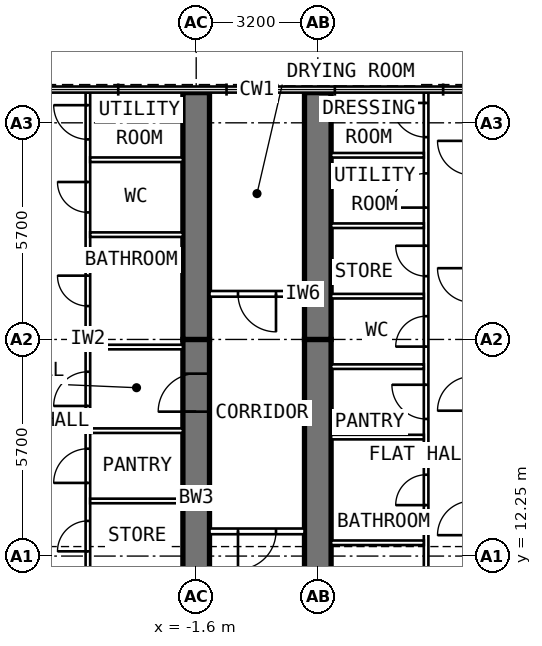
"""IFC4 building model, lengths in metres.
Left out: names, types, materials, properties, quantities, classifications, styles, units other than length and angle.
Written with IfcOpenShell. Run it as: python <this file> out.ifc"""

import sys

from ifc_helpers import new_model, si_unit, direction, frame, frame_2d, origin, place, context, subcontext, project, spatial, rectangle, extrude, element, fill, save


model = new_model("IFC4")
c1 = context("Model", 3, precision=1e-05, world=origin(), true_north=direction((0.0, 1.0)))
c2 = subcontext(c1, "Body", "Model", "MODEL_VIEW")
j1 = project(units=[si_unit("LENGTHUNIT", "METRE"), si_unit("PLANEANGLEUNIT", "RADIAN")], contexts=[c1])
p1 = place(None, origin())
s1 = spatial("IfcSite", under=j1, at=p1, CompositionType="ELEMENT")
p2 = place(p1, origin())
s2 = spatial("IfcBuilding", under=s1, at=p2, CompositionType="ELEMENT")
p3 = place(p2, frame((0.0, 0.0, 271.0)))
s3 = spatial("IfcBuildingStorey", under=s2, at=p3, CompositionType="ELEMENT", Elevation=271.0)
p4 = place(p3, frame((-1.6, 9.6, 0.0), z_axis=(0.0, 0.0, 1.0), x_axis=(0.0, 1.0, 0.0)))
e1 = element("IfcWall", 1, at=p4, inside=s3, PredefinedType="SHEAR", context=c2, shape_type="SweptSolid", body=[
    extrude(rectangle(XDim=8.35, YDim=0.7, at=frame_2d((4.175, 0.0))), origin(), (0.0, 0.0, 1.0), 3.6),
])
p5 = place(p4, frame((6.45, 0.0, 0.0)))
e2 = element("IfcOpeningElement", 2, at=p5, cuts=e1, PredefinedType="OPENING", context=c2, shape_type="SweptSolid", body=[
    extrude(rectangle(XDim=1.0, YDim=2.1, at=frame_2d((0.5, 1.05))), frame((0.0, 0.362, 0.0), z_axis=(0.0, -1.0, 0.0), x_axis=(1.0, 0.0, 0.0)), (0.0, 0.0, 1.0), 0.724),
])
p6 = place(p3, frame((-1.6, 17.95, 0.0), z_axis=(0.0, 0.0, 1.0), x_axis=(0.0, 1.0, 0.0)))
e3 = element("IfcWall", 3, at=p6, inside=s3, PredefinedType="SHEAR", context=c2, shape_type="SweptSolid", body=[
    extrude(rectangle(XDim=6.495, YDim=0.7, at=frame_2d((3.248, 0.0))), origin(), (0.0, 0.0, 1.0), 3.6),
])
p7 = place(p3, frame((1.6, 9.6, 0.0), z_axis=(0.0, 0.0, 1.0), x_axis=(0.0, 1.0, 0.0)))
e4 = element("IfcWall", 4, at=p7, inside=s3, PredefinedType="SHEAR", context=c2, shape_type="SweptSolid", body=[
    extrude(rectangle(XDim=8.35, YDim=0.7, at=frame_2d((4.175, 0.0))), origin(), (0.0, 0.0, 1.0), 3.6),
])
p8 = place(p7, frame((1.3, 0.0, 0.0)))
e5 = element("IfcOpeningElement", 5, at=p8, cuts=e4, PredefinedType="OPENING", context=c2, shape_type="SweptSolid", body=[
    extrude(rectangle(XDim=1.0, YDim=2.1, at=frame_2d((0.5, 1.05))), frame((0.0, 0.362, 0.0), z_axis=(0.0, -1.0, 0.0), x_axis=(1.0, 0.0, 0.0)), (0.0, 0.0, 1.0), 0.724),
])
p9 = place(p3, frame((1.6, 17.95, 0.0), z_axis=(0.0, 0.0, 1.0), x_axis=(0.0, 1.0, 0.0)))
e6 = element("IfcWall", 6, at=p9, inside=s3, PredefinedType="SHEAR", context=c2, shape_type="SweptSolid", body=[
    extrude(rectangle(XDim=6.495, YDim=0.7, at=frame_2d((3.248, 0.0))), origin(), (0.0, 0.0, 1.0), 3.6),
])
p10 = place(p3, frame((-4.45, 9.875, 0.0), z_axis=(0.0, 0.0, 1.0), x_axis=(0.0, 1.0, 0.0)))
e7 = element("IfcWall", 7, at=p10, inside=s3, PredefinedType="PARTITIONING", context=c2, shape_type="SweptSolid", body=[
    extrude(rectangle(XDim=14.57, YDim=0.12, at=frame_2d((7.285, 0.0))), origin(), (0.0, 0.0, 1.0), 3.35),
])
p11 = place(p10, frame((0.6, 0.0, 0.0)))
e8 = element("IfcOpeningElement", 8, at=p11, cuts=e7, PredefinedType="OPENING", context=c2, shape_type="SweptSolid", body=[
    extrude(rectangle(XDim=0.9, YDim=2.1, at=frame_2d((0.45, 1.05))), frame((0.0, 0.072, 0.0), z_axis=(0.0, -1.0, 0.0), x_axis=(1.0, 0.0, 0.0)), (0.0, 0.0, 1.0), 0.144),
])
p12 = place(p10, frame((2.5, 0.0, 0.0)))
e9 = element("IfcOpeningElement", 9, at=p12, cuts=e7, PredefinedType="OPENING", context=c2, shape_type="SweptSolid", body=[
    extrude(rectangle(XDim=0.8, YDim=2.1, at=frame_2d((0.4, 1.05))), frame((0.0, 0.072, 0.0), z_axis=(0.0, -1.0, 0.0), x_axis=(1.0, 0.0, 0.0)), (0.0, 0.0, 1.0), 0.144),
])
p13 = place(p10, frame((4.3, 0.0, 0.0)))
e10 = element("IfcOpeningElement", 10, at=p13, cuts=e7, PredefinedType="OPENING", context=c2, shape_type="SweptSolid", body=[
    extrude(rectangle(XDim=0.9, YDim=2.1, at=frame_2d((0.45, 1.05))), frame((0.0, 0.072, 0.0), z_axis=(0.0, -1.0, 0.0), x_axis=(1.0, 0.0, 0.0)), (0.0, 0.0, 1.0), 0.144),
])
p14 = place(p10, frame((6.325, 0.0, 0.0)))
e11 = element("IfcOpeningElement", 11, at=p14, cuts=e7, PredefinedType="OPENING", context=c2, shape_type="SweptSolid", body=[
    extrude(rectangle(XDim=0.9, YDim=2.1, at=frame_2d((0.45, 1.05))), frame((0.0, 0.072, 0.0), z_axis=(0.0, -1.0, 0.0), x_axis=(1.0, 0.0, 0.0)), (0.0, 0.0, 1.0), 0.144),
])
p15 = place(p10, frame((8.954, 0.0, 0.0)))
e12 = element("IfcOpeningElement", 12, at=p15, cuts=e7, PredefinedType="OPENING", context=c2, shape_type="SweptSolid", body=[
    extrude(rectangle(XDim=0.8, YDim=2.1, at=frame_2d((0.4, 1.05))), frame((0.0, 0.072, 0.0), z_axis=(0.0, -1.0, 0.0), x_axis=(1.0, 0.0, 0.0)), (0.0, 0.0, 1.0), 0.144),
])
p16 = place(p10, frame((11.418, 0.0, 0.0)))
e13 = element("IfcOpeningElement", 13, at=p16, cuts=e7, PredefinedType="OPENING", context=c2, shape_type="SweptSolid", body=[
    extrude(rectangle(XDim=0.8, YDim=2.1, at=frame_2d((0.4, 1.05))), frame((0.0, 0.072, 0.0), z_axis=(0.0, -1.0, 0.0), x_axis=(1.0, 0.0, 0.0)), (0.0, 0.0, 1.0), 0.144),
])
p17 = place(p10, frame((13.339, 0.0, 0.0)))
e14 = element("IfcOpeningElement", 14, at=p17, cuts=e7, PredefinedType="OPENING", context=c2, shape_type="SweptSolid", body=[
    extrude(rectangle(XDim=0.9, YDim=2.1, at=frame_2d((0.45, 1.05))), frame((0.0, 0.072, 0.0), z_axis=(0.0, -1.0, 0.0), x_axis=(1.0, 0.0, 0.0)), (0.0, 0.0, 1.0), 0.144),
])
for number, where, z_axis, x_axis in (
    (15, (-1.95, 13.7, 0.0), (0.0, 0.0, 1.0), (-1.0, 0.0, 0.0)),
    (16, (-1.95, 15.55, 0.0), (0.0, 0.0, 1.0), (-1.0, 0.0, 0.0)),
):
    element("IfcWall", number, at=place(p3, frame(where, z_axis=z_axis, x_axis=x_axis)), inside=s3, PredefinedType="PARTITIONING", context=c2, shape_type="SweptSolid", body=[
        extrude(rectangle(XDim=2.44, YDim=0.12, at=frame_2d((1.22, 0.0))), origin(), (0.0, 0.0, 1.0), 3.35),
    ])
p18 = place(p3, frame((-1.95, 17.75, 0.0), z_axis=(0.0, 0.0, 1.0), x_axis=(-1.0, 0.0, 0.0)))
e17 = element("IfcWall", 17, at=p18, inside=s3, PredefinedType="PARTITIONING", context=c2, shape_type="SweptSolid", body=[
    extrude(rectangle(XDim=2.44, YDim=0.12, at=frame_2d((1.22, 0.0))), origin(), (0.0, 0.0, 1.0), 2.45),
])
for number, where, z_axis, x_axis in (
    (18, (-1.95, 20.707, 0.0), (0.0, 0.0, 1.0), (-1.0, 0.0, 0.0)),
    (19, (-1.95, 22.678, 0.0), (0.0, 0.0, 1.0), (-1.0, 0.0, 0.0)),
):
    element("IfcWall", number, at=place(p3, frame(where, z_axis=z_axis, x_axis=x_axis)), inside=s3, PredefinedType="PARTITIONING", context=c2, shape_type="SweptSolid", body=[
        extrude(rectangle(XDim=2.44, YDim=0.12, at=frame_2d((1.22, 0.0))), origin(), (0.0, 0.0, 1.0), 3.35),
    ])
p19 = place(p3, frame((4.45, 9.875, 0.0), z_axis=(0.0, 0.0, 1.0), x_axis=(0.0, 1.0, 0.0)))
e20 = element("IfcWall", 20, at=p19, inside=s3, PredefinedType="PARTITIONING", context=c2, shape_type="SweptSolid", body=[
    extrude(rectangle(XDim=14.57, YDim=0.12, at=frame_2d((7.285, 0.0))), origin(), (0.0, 0.0, 1.0), 3.35),
])
p20 = place(p19, frame((0.975, 0.0, 0.0)))
e21 = element("IfcOpeningElement", 21, at=p20, cuts=e20, PredefinedType="OPENING", context=c2, shape_type="SweptSolid", body=[
    extrude(rectangle(XDim=0.9, YDim=2.1, at=frame_2d((0.45, 1.05))), frame((0.0, 0.072, 0.0), z_axis=(0.0, -1.0, 0.0), x_axis=(1.0, 0.0, 0.0)), (0.0, 0.0, 1.0), 0.144),
])
p21 = place(p19, frame((3.715, 0.0, 0.0)))
e22 = element("IfcOpeningElement", 22, at=p21, cuts=e20, PredefinedType="OPENING", context=c2, shape_type="SweptSolid", body=[
    extrude(rectangle(XDim=0.8, YDim=2.1, at=frame_2d((0.4, 1.05))), frame((0.0, 0.072, 0.0), z_axis=(0.0, -1.0, 0.0), x_axis=(1.0, 0.0, 0.0)), (0.0, 0.0, 1.0), 0.144),
])
p22 = place(p19, frame((5.983, 0.0, 0.0)))
e23 = element("IfcOpeningElement", 23, at=p22, cuts=e20, PredefinedType="OPENING", context=c2, shape_type="SweptSolid", body=[
    extrude(rectangle(XDim=0.9, YDim=2.1, at=frame_2d((0.45, 1.05))), frame((0.0, 0.072, 0.0), z_axis=(0.0, -1.0, 0.0), x_axis=(1.0, 0.0, 0.0)), (0.0, 0.0, 1.0), 0.144),
])
p23 = place(p19, frame((7.886, 0.0, 0.0)))
e24 = element("IfcOpeningElement", 24, at=p23, cuts=e20, PredefinedType="OPENING", context=c2, shape_type="SweptSolid", body=[
    extrude(rectangle(XDim=0.8, YDim=2.1, at=frame_2d((0.4, 1.05))), frame((0.0, 0.072, 0.0), z_axis=(0.0, -1.0, 0.0), x_axis=(1.0, 0.0, 0.0)), (0.0, 0.0, 1.0), 0.144),
])
p24 = place(p19, frame((9.74, 0.0, 0.0)))
e25 = element("IfcOpeningElement", 25, at=p24, cuts=e20, PredefinedType="OPENING", context=c2, shape_type="SweptSolid", body=[
    extrude(rectangle(XDim=0.8, YDim=2.1, at=frame_2d((0.4, 1.05))), frame((0.0, 0.072, 0.0), z_axis=(0.0, -1.0, 0.0), x_axis=(1.0, 0.0, 0.0)), (0.0, 0.0, 1.0), 0.144),
])
p25 = place(p19, frame((11.544, 0.0, 0.0)))
e26 = element("IfcOpeningElement", 26, at=p25, cuts=e20, PredefinedType="OPENING", context=c2, shape_type="SweptSolid", body=[
    extrude(rectangle(XDim=0.9, YDim=2.1, at=frame_2d((0.45, 1.05))), frame((0.0, 0.072, 0.0), z_axis=(0.0, -1.0, 0.0), x_axis=(1.0, 0.0, 0.0)), (0.0, 0.0, 1.0), 0.144),
])
p26 = place(p19, frame((13.398, 0.0, 0.0)))
e27 = element("IfcOpeningElement", 27, at=p26, cuts=e20, PredefinedType="OPENING", context=c2, shape_type="SweptSolid", body=[
    extrude(rectangle(XDim=0.9, YDim=2.1, at=frame_2d((0.45, 1.05))), frame((0.0, 0.072, 0.0), z_axis=(0.0, -1.0, 0.0), x_axis=(1.0, 0.0, 0.0)), (0.0, 0.0, 1.0), 0.144),
])
p27 = place(p3, frame((1.95, 12.6, 0.0), z_axis=(0.0, 0.0, 1.0), x_axis=(1.0, 0.0, 0.0)))
e28 = element("IfcWall", 28, at=p27, inside=s3, PredefinedType="PARTITIONING", context=c2, shape_type="SweptSolid", body=[
    extrude(rectangle(XDim=2.44, YDim=0.12, at=frame_2d((1.22, 0.0))), origin(), (0.0, 0.0, 1.0), 2.45),
])
for number, where, z_axis, x_axis in (
    (29, (1.95, 15.381, 0.0), (0.0, 0.0, 1.0), (1.0, 0.0, 0.0)),
    (30, (1.95, 17.235, 0.0), (0.0, 0.0, 1.0), (1.0, 0.0, 0.0)),
    (31, (1.95, 19.088, 0.0), (0.0, 0.0, 1.0), (1.0, 0.0, 0.0)),
    (32, (1.95, 20.942, 0.0), (0.0, 0.0, 1.0), (1.0, 0.0, 0.0)),
    (33, (1.95, 22.796, 0.0), (0.0, 0.0, 1.0), (1.0, 0.0, 0.0)),
):
    element("IfcWall", number, at=place(p3, frame(where, z_axis=z_axis, x_axis=x_axis)), inside=s3, PredefinedType="PARTITIONING", context=c2, shape_type="SweptSolid", body=[
        extrude(rectangle(XDim=2.44, YDim=0.12, at=frame_2d((1.22, 0.0))), origin(), (0.0, 0.0, 1.0), 3.35),
    ])
p28 = place(p3, frame((1.25, 19.15, 0.0), z_axis=(0.0, 0.0, 1.0), x_axis=(-1.0, 0.0, 0.0)))
e34 = element("IfcWall", 34, at=p28, inside=s3, PredefinedType="PARTITIONING", context=c2, shape_type="SweptSolid", body=[
    extrude(rectangle(XDim=2.5, YDim=0.15, at=frame_2d((1.25, 0.0))), origin(), (0.0, 0.0, 1.0), 3.35),
])
p29 = place(p28, frame((0.75, 0.0, 0.0)))
e35 = element("IfcOpeningElement", 35, at=p29, cuts=e34, PredefinedType="OPENING", context=c2, shape_type="SweptSolid", body=[
    extrude(rectangle(XDim=1.0, YDim=2.1, at=frame_2d((0.5, 1.05))), frame((0.0, 0.087, 0.0), z_axis=(0.0, -1.0, 0.0), x_axis=(1.0, 0.0, 0.0)), (0.0, 0.0, 1.0), 0.174),
])
p30 = place(p3, frame((1.25, 12.9, 0.0), z_axis=(0.0, 0.0, 1.0), x_axis=(-1.0, 0.0, 0.0)))
e36 = element("IfcWall", 36, at=p30, inside=s3, PredefinedType="PARTITIONING", context=c2, shape_type="SweptSolid", body=[
    extrude(rectangle(XDim=2.5, YDim=0.15, at=frame_2d((1.25, 0.0))), origin(), (0.0, 0.0, 1.0), 3.35),
])
p31 = place(p30, frame((0.75, 0.0, 0.0)))
e37 = element("IfcOpeningElement", 37, at=p31, cuts=e36, PredefinedType="OPENING", context=c2, shape_type="SweptSolid", body=[
    extrude(rectangle(XDim=1.0, YDim=2.1, at=frame_2d((0.5, 1.05))), frame((0.0, 0.087, 0.0), z_axis=(0.0, -1.0, 0.0), x_axis=(1.0, 0.0, 0.0)), (0.0, 0.0, 1.0), 0.174),
])
p32 = place(p5, origin())
e38 = element("IfcDoor", 38, at=p32, inside=s3, OperationType="SINGLE_SWING_LEFT", PredefinedType="DOOR", context=c2, shape_type="SweptSolid", body=[
    extrude(rectangle(XDim=1.0, YDim=2.1, at=frame_2d((0.5, 1.05))), frame((0.0, 0.1, 0.0), z_axis=(0.0, -1.0, 0.0), x_axis=(1.0, 0.0, 0.0)), (0.0, 0.0, 1.0), 0.2),
])
fill(e2, e38)
p33 = place(p12, origin())
e39 = element("IfcDoor", 39, at=p33, inside=s3, OperationType="SINGLE_SWING_LEFT", PredefinedType="DOOR", context=c2, shape_type="SweptSolid", body=[
    extrude(rectangle(XDim=0.8, YDim=2.1, at=frame_2d((0.4, 1.05))), frame((0.0, 0.025, 0.0), z_axis=(0.0, -1.0, 0.0), x_axis=(1.0, 0.0, 0.0)), (0.0, 0.0, 1.0), 0.05),
])
fill(e9, e39)
p34 = place(p13, origin())
e40 = element("IfcDoor", 40, at=p34, inside=s3, OperationType="SINGLE_SWING_LEFT", PredefinedType="DOOR", context=c2, shape_type="SweptSolid", body=[
    extrude(rectangle(XDim=0.9, YDim=2.1, at=frame_2d((0.45, 1.05))), frame((0.0, 0.025, 0.0), z_axis=(0.0, -1.0, 0.0), x_axis=(1.0, 0.0, 0.0)), (0.0, 0.0, 1.0), 0.05),
])
fill(e10, e40)
p35 = place(p14, origin())
e41 = element("IfcDoor", 41, at=p35, inside=s3, OperationType="SINGLE_SWING_LEFT", PredefinedType="DOOR", context=c2, shape_type="SweptSolid", body=[
    extrude(rectangle(XDim=0.9, YDim=2.1, at=frame_2d((0.45, 1.05))), frame((0.0, 0.025, 0.0), z_axis=(0.0, -1.0, 0.0), x_axis=(1.0, 0.0, 0.0)), (0.0, 0.0, 1.0), 0.05),
])
fill(e11, e41)
p36 = place(p15, origin())
e42 = element("IfcDoor", 42, at=p36, inside=s3, OperationType="SINGLE_SWING_RIGHT", PredefinedType="DOOR", context=c2, shape_type="SweptSolid", body=[
    extrude(rectangle(XDim=0.8, YDim=2.1, at=frame_2d((0.4, 1.05))), frame((0.0, 0.025, 0.0), z_axis=(0.0, -1.0, 0.0), x_axis=(1.0, 0.0, 0.0)), (0.0, 0.0, 1.0), 0.05),
])
fill(e12, e42)
p37 = place(p16, origin())
e43 = element("IfcDoor", 43, at=p37, inside=s3, OperationType="SINGLE_SWING_RIGHT", PredefinedType="DOOR", context=c2, shape_type="SweptSolid", body=[
    extrude(rectangle(XDim=0.8, YDim=2.1, at=frame_2d((0.4, 1.05))), frame((0.0, 0.025, 0.0), z_axis=(0.0, -1.0, 0.0), x_axis=(1.0, 0.0, 0.0)), (0.0, 0.0, 1.0), 0.05),
])
fill(e13, e43)
p38 = place(p17, origin())
e44 = element("IfcDoor", 44, at=p38, inside=s3, OperationType="SINGLE_SWING_RIGHT", PredefinedType="DOOR", context=c2, shape_type="SweptSolid", body=[
    extrude(rectangle(XDim=0.9, YDim=2.1, at=frame_2d((0.45, 1.05))), frame((0.0, 0.025, 0.0), z_axis=(0.0, -1.0, 0.0), x_axis=(1.0, 0.0, 0.0)), (0.0, 0.0, 1.0), 0.05),
])
fill(e14, e44)
p39 = place(p21, origin())
e45 = element("IfcDoor", 45, at=p39, inside=s3, OperationType="SINGLE_SWING_LEFT", PredefinedType="DOOR", context=c2, shape_type="SweptSolid", body=[
    extrude(rectangle(XDim=0.8, YDim=2.1, at=frame_2d((0.4, 1.05))), frame((0.0, 0.025, 0.0), z_axis=(0.0, -1.0, 0.0), x_axis=(1.0, 0.0, 0.0)), (0.0, 0.0, 1.0), 0.05),
])
fill(e22, e45)
p40 = place(p22, origin())
e46 = element("IfcDoor", 46, at=p40, inside=s3, OperationType="SINGLE_SWING_RIGHT", PredefinedType="DOOR", context=c2, shape_type="SweptSolid", body=[
    extrude(rectangle(XDim=0.9, YDim=2.1, at=frame_2d((0.45, 1.05))), frame((0.0, 0.025, 0.0), z_axis=(0.0, -1.0, 0.0), x_axis=(1.0, 0.0, 0.0)), (0.0, 0.0, 1.0), 0.05),
])
fill(e23, e46)
p41 = place(p23, origin())
e47 = element("IfcDoor", 47, at=p41, inside=s3, OperationType="SINGLE_SWING_LEFT", PredefinedType="DOOR", context=c2, shape_type="SweptSolid", body=[
    extrude(rectangle(XDim=0.8, YDim=2.1, at=frame_2d((0.4, 1.05))), frame((0.0, 0.025, 0.0), z_axis=(0.0, -1.0, 0.0), x_axis=(1.0, 0.0, 0.0)), (0.0, 0.0, 1.0), 0.05),
])
fill(e24, e47)
p42 = place(p24, origin())
e48 = element("IfcDoor", 48, at=p42, inside=s3, OperationType="SINGLE_SWING_RIGHT", PredefinedType="DOOR", context=c2, shape_type="SweptSolid", body=[
    extrude(rectangle(XDim=0.8, YDim=2.1, at=frame_2d((0.4, 1.05))), frame((0.0, 0.025, 0.0), z_axis=(0.0, -1.0, 0.0), x_axis=(1.0, 0.0, 0.0)), (0.0, 0.0, 1.0), 0.05),
])
fill(e25, e48)
p43 = place(p25, origin())
e49 = element("IfcDoor", 49, at=p43, inside=s3, OperationType="SINGLE_SWING_LEFT", PredefinedType="DOOR", context=c2, shape_type="SweptSolid", body=[
    extrude(rectangle(XDim=0.9, YDim=2.1, at=frame_2d((0.45, 1.05))), frame((0.0, 0.025, 0.0), z_axis=(0.0, -1.0, 0.0), x_axis=(1.0, 0.0, 0.0)), (0.0, 0.0, 1.0), 0.05),
])
fill(e26, e49)
p44 = place(p26, origin())
e50 = element("IfcDoor", 50, at=p44, inside=s3, OperationType="SINGLE_SWING_RIGHT", PredefinedType="DOOR", context=c2, shape_type="SweptSolid", body=[
    extrude(rectangle(XDim=0.9, YDim=2.1, at=frame_2d((0.45, 1.05))), frame((0.0, 0.025, 0.0), z_axis=(0.0, -1.0, 0.0), x_axis=(1.0, 0.0, 0.0)), (0.0, 0.0, 1.0), 0.05),
])
fill(e27, e50)
p45 = place(p29, origin())
e51 = element("IfcDoor", 51, at=p45, inside=s3, OperationType="SINGLE_SWING_LEFT", PredefinedType="DOOR", context=c2, shape_type="SweptSolid", body=[
    extrude(rectangle(XDim=1.0, YDim=2.1, at=frame_2d((0.5, 1.05))), frame((0.0, 0.025, 0.0), z_axis=(0.0, -1.0, 0.0), x_axis=(1.0, 0.0, 0.0)), (0.0, 0.0, 1.0), 0.05),
])
fill(e35, e51)
p46 = place(p31, origin())
e52 = element("IfcDoor", 52, at=p46, inside=s3, OperationType="SINGLE_SWING_RIGHT", PredefinedType="DOOR", context=c2, shape_type="SweptSolid", body=[
    extrude(rectangle(XDim=1.0, YDim=2.1, at=frame_2d((0.5, 1.05))), frame((0.0, 0.025, 0.0), z_axis=(0.0, -1.0, 0.0), x_axis=(1.0, 0.0, 0.0)), (0.0, 0.0, 1.0), 0.05),
])
fill(e37, e52)
save(model, sys.argv[1])
